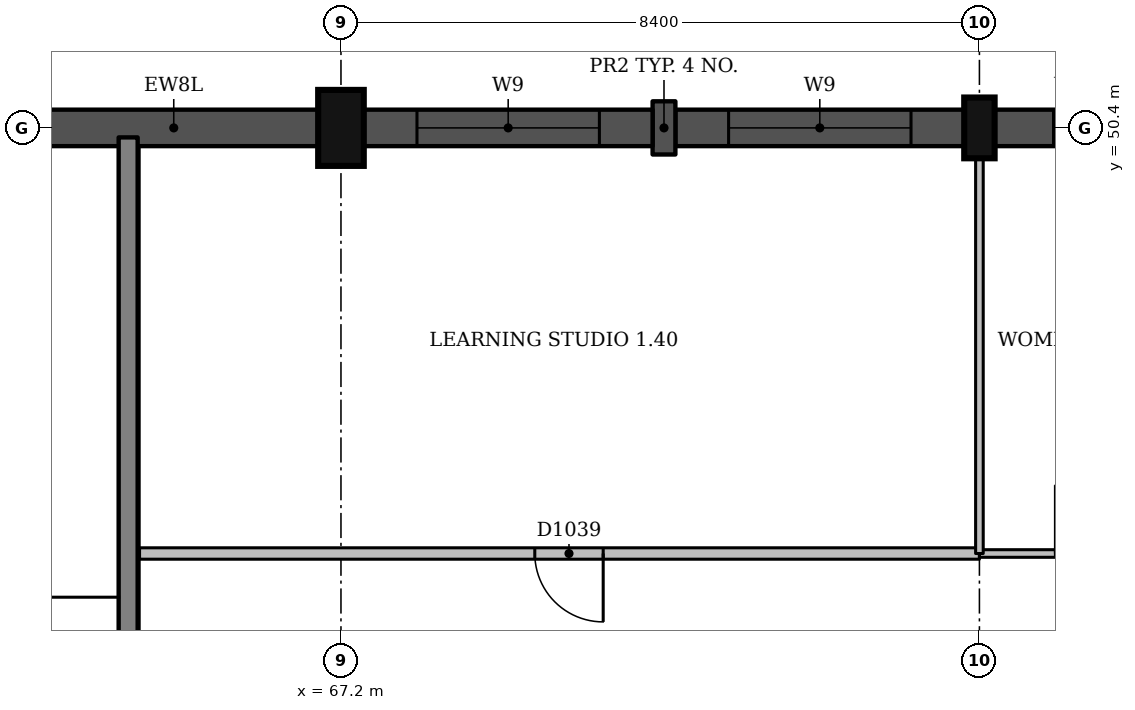
"""IFC4 building model, lengths in metres.
Left out: names, types, materials, properties, quantities, classifications, styles, units other than length and angle.
Written with IfcOpenShell. Run it as: python <this file> out.ifc"""

import sys

from ifc_helpers import new_model, si_unit, direction, frame, frame_2d, origin, origin_2d, place, context, subcontext, project, spatial, rectangle, extrude, element, fill, save


model = new_model("IFC4")
c1 = context("Model", 3, precision=1e-05, world=origin(), true_north=direction((0.0, 1.0)))
c2 = subcontext(c1, "Body", "Model", "MODEL_VIEW")
j1 = project(units=[si_unit("LENGTHUNIT", "METRE"), si_unit("PLANEANGLEUNIT", "RADIAN")], contexts=[c1])
p1 = place(None, origin())
s1 = spatial("IfcSite", under=j1, at=p1, CompositionType="ELEMENT")
p2 = place(p1, origin())
s2 = spatial("IfcBuilding", under=s1, at=p2, CompositionType="ELEMENT")
p3 = place(p2, frame((0.0, 0.0, 4.5)))
s3 = spatial("IfcBuildingStorey", under=s2, at=p3, CompositionType="ELEMENT", Elevation=4.5)
p4 = place(p3, frame((67.2, 50.4, 0.0), z_axis=(0.0, 0.0, 1.0), x_axis=(1.0, 0.0, 0.0)))
e1 = element("IfcColumn", 1, at=p4, inside=s3, PredefinedType="COLUMN", context=c2, shape_type="SweptSolid", body=[
    extrude(rectangle(XDim=0.6, YDim=1.0, at=origin_2d()), origin(), (0.0, 0.0, 1.0), 4.5),
])
p5 = place(p3, frame((75.6, 50.4, 0.0), z_axis=(0.0, 0.0, 1.0), x_axis=(1.0, 0.0, 0.0)))
e2 = element("IfcColumn", 2, at=p5, inside=s3, PredefinedType="COLUMN", context=c2, shape_type="SweptSolid", body=[
    extrude(rectangle(XDim=0.4, YDim=0.8, at=origin_2d()), origin(), (0.0, 0.0, 1.0), 4.5),
])
p6 = place(p3, frame((64.4, 42.125, 0.0), z_axis=(0.0, 0.0, 1.0), x_axis=(0.0, 1.0, 0.0)))
e3 = element("IfcWall", 3, at=p6, inside=s3, PredefinedType="SHEAR", context=c2, shape_type="SweptSolid", body=[
    extrude(rectangle(XDim=8.15, YDim=0.25, at=frame_2d((4.075, 0.0))), origin(), (0.0, 0.0, 1.0), 4.5),
])
p7 = place(p3, frame((77.95, 50.4, 0.0), z_axis=(0.0, 0.0, 1.0), x_axis=(-1.0, 0.0, 0.0)))
e4 = element("IfcWall", 4, at=p7, inside=s3, PredefinedType="SOLIDWALL", context=c2, shape_type="SweptSolid", body=[
    extrude(rectangle(XDim=2.15, YDim=0.48, at=frame_2d((1.075, 0.0))), origin(), (0.0, 0.0, 1.0), 3.75),
])
p8 = place(p7, frame((0.775, 0.0, 1.5)))
e5 = element("IfcOpeningElement", 5, at=p8, cuts=e4, PredefinedType="OPENING", context=c2, shape_type="SweptSolid", body=[
    extrude(rectangle(XDim=0.6, YDim=1.2, at=frame_2d((0.3, 0.6))), frame((0.0, 0.25, 0.0), z_axis=(0.0, -1.0, 0.0), x_axis=(1.0, 0.0, 0.0)), (0.0, 0.0, 1.0), 0.5),
])
p9 = place(p3, frame((75.4, 50.4, 0.0), z_axis=(0.0, 0.0, 1.0), x_axis=(-1.0, 0.0, 0.0)))
e6 = element("IfcWall", 6, at=p9, inside=s3, PredefinedType="SOLIDWALL", context=c2, shape_type="SweptSolid", body=[
    extrude(rectangle(XDim=3.8, YDim=0.48, at=frame_2d((1.9, 0.0))), origin(), (0.0, 0.0, 1.0), 3.75),
])
p10 = place(p9, frame((0.7, 0.0, 0.9)))
e7 = element("IfcOpeningElement", 7, at=p10, cuts=e6, PredefinedType="OPENING", context=c2, shape_type="SweptSolid", body=[
    extrude(rectangle(XDim=2.4, YDim=1.8, at=frame_2d((1.2, 0.9))), frame((0.0, 0.25, 0.0), z_axis=(0.0, -1.0, 0.0), x_axis=(1.0, 0.0, 0.0)), (0.0, 0.0, 1.0), 0.5),
])
p11 = place(p3, frame((71.6, 50.4, 0.0), z_axis=(0.0, 0.0, 1.0), x_axis=(-1.0, 0.0, 0.0)))
e8 = element("IfcWall", 8, at=p11, inside=s3, PredefinedType="SOLIDWALL", context=c2, shape_type="SweptSolid", body=[
    extrude(rectangle(XDim=0.3, YDim=0.7, at=frame_2d((0.15, 0.0))), origin(), (0.0, 0.0, 1.0), 3.75),
])
p12 = place(p3, frame((71.3, 50.4, 0.0), z_axis=(0.0, 0.0, 1.0), x_axis=(-1.0, 0.0, 0.0)))
e9 = element("IfcWall", 9, at=p12, inside=s3, PredefinedType="SOLIDWALL", context=c2, shape_type="SweptSolid", body=[
    extrude(rectangle(XDim=3.8, YDim=0.48, at=frame_2d((1.9, 0.0))), origin(), (0.0, 0.0, 1.0), 3.75),
])
p13 = place(p12, frame((0.7, 0.0, 0.9)))
e10 = element("IfcOpeningElement", 10, at=p13, cuts=e9, PredefinedType="OPENING", context=c2, shape_type="SweptSolid", body=[
    extrude(rectangle(XDim=2.4, YDim=1.8, at=frame_2d((1.2, 0.9))), frame((0.0, 0.25, 0.0), z_axis=(0.0, -1.0, 0.0), x_axis=(1.0, 0.0, 0.0)), (0.0, 0.0, 1.0), 0.5),
])
p14 = place(p3, frame((66.9, 50.4, 0.0), z_axis=(0.0, 0.0, 1.0), x_axis=(-1.0, 0.0, 0.0)))
e11 = element("IfcWall", 11, at=p14, inside=s3, PredefinedType="SOLIDWALL", context=c2, shape_type="SweptSolid", body=[
    extrude(rectangle(XDim=3.8, YDim=0.48, at=frame_2d((1.9, 0.0))), origin(), (0.0, 0.0, 1.0), 3.75),
])
p15 = place(p3, frame((64.55, 44.8, 0.0), z_axis=(0.0, 0.0, 1.0), x_axis=(1.0, 0.0, 0.0)))
e12 = element("IfcWall", 12, at=p15, inside=s3, PredefinedType="PARTITIONING", context=c2, shape_type="SweptSolid", body=[
    extrude(rectangle(XDim=11.05, YDim=0.15, at=frame_2d((5.525, 0.0))), origin(), (0.0, 0.0, 1.0), 4.15),
])
p16 = place(p15, frame((5.2, 0.0, 0.0)))
e13 = element("IfcOpeningElement", 13, at=p16, cuts=e12, PredefinedType="OPENING", context=c2, shape_type="SweptSolid", body=[
    extrude(rectangle(XDim=0.9, YDim=2.1, at=frame_2d((0.45, 1.05))), frame((0.0, 0.085, 0.0), z_axis=(0.0, -1.0, 0.0), x_axis=(1.0, 0.0, 0.0)), (0.0, 0.0, 1.0), 0.17),
])
p17 = place(p3, frame((75.6, 44.8, 0.0), z_axis=(0.0, 0.0, 1.0), x_axis=(1.0, 0.0, 0.0)))
e14 = element("IfcWall", 14, at=p17, inside=s3, PredefinedType="PARTITIONING", context=c2, shape_type="SweptSolid", body=[
    extrude(rectangle(XDim=8.25, YDim=0.1, at=frame_2d((4.125, 0.0))), origin(), (0.0, 0.0, 1.0), 4.15),
])
p18 = place(p17, frame((1.0, 0.0, 0.0)))
e15 = element("IfcOpeningElement", 15, at=p18, cuts=e14, PredefinedType="OPENING", context=c2, shape_type="SweptSolid", body=[
    extrude(rectangle(XDim=0.9, YDim=2.1, at=frame_2d((0.45, 1.05))), frame((0.0, 0.06, 0.0), z_axis=(0.0, -1.0, 0.0), x_axis=(1.0, 0.0, 0.0)), (0.0, 0.0, 1.0), 0.12),
])
p19 = place(p17, frame((3.8, 0.0, 0.0)))
e16 = element("IfcOpeningElement", 16, at=p19, cuts=e14, PredefinedType="OPENING", context=c2, shape_type="SweptSolid", body=[
    extrude(rectangle(XDim=0.9, YDim=2.1, at=frame_2d((0.45, 1.05))), frame((0.0, 0.06, 0.0), z_axis=(0.0, -1.0, 0.0), x_axis=(1.0, 0.0, 0.0)), (0.0, 0.0, 1.0), 0.12),
])
p20 = place(p17, frame((6.6, 0.0, 0.0)))
e17 = element("IfcOpeningElement", 17, at=p20, cuts=e14, PredefinedType="OPENING", context=c2, shape_type="SweptSolid", body=[
    extrude(rectangle(XDim=1.0, YDim=2.1, at=frame_2d((0.5, 1.05))), frame((0.0, 0.06, 0.0), z_axis=(0.0, -1.0, 0.0), x_axis=(1.0, 0.0, 0.0)), (0.0, 0.0, 1.0), 0.12),
])
p21 = place(p3, frame((75.6, 44.8, 0.0), z_axis=(0.0, 0.0, 1.0), x_axis=(0.0, 1.0, 0.0)))
e18 = element("IfcWall", 18, at=p21, inside=s3, PredefinedType="PARTITIONING", context=c2, shape_type="SweptSolid", body=[
    extrude(rectangle(XDim=5.2, YDim=0.1, at=frame_2d((2.6, 0.0))), origin(), (0.0, 0.0, 1.0), 2.489),
])
p22 = place(p8, origin())
e19 = element("IfcWindow", 19, at=p22, inside=s3, PartitioningType="SINGLE_PANEL", PredefinedType="WINDOW", context=c2, shape_type="SweptSolid", body=[
    extrude(rectangle(XDim=0.6, YDim=1.2, at=frame_2d((0.3, 0.6))), frame((0.0, 0.12, 0.0), z_axis=(0.0, -1.0, 0.0), x_axis=(1.0, 0.0, 0.0)), (0.0, 0.0, 1.0), 0.06),
])
fill(e5, e19)
p23 = place(p10, origin())
e20 = element("IfcWindow", 20, at=p23, inside=s3, PartitioningType="SINGLE_PANEL", PredefinedType="WINDOW", context=c2, shape_type="SweptSolid", body=[
    extrude(rectangle(XDim=2.4, YDim=1.8, at=frame_2d((1.2, 0.9))), frame((0.0, 0.12, 0.0), z_axis=(0.0, -1.0, 0.0), x_axis=(1.0, 0.0, 0.0)), (0.0, 0.0, 1.0), 0.06),
])
fill(e7, e20)
p24 = place(p13, origin())
e21 = element("IfcWindow", 21, at=p24, inside=s3, PartitioningType="SINGLE_PANEL", PredefinedType="WINDOW", context=c2, shape_type="SweptSolid", body=[
    extrude(rectangle(XDim=2.4, YDim=1.8, at=frame_2d((1.2, 0.9))), frame((0.0, 0.12, 0.0), z_axis=(0.0, -1.0, 0.0), x_axis=(1.0, 0.0, 0.0)), (0.0, 0.0, 1.0), 0.06),
])
fill(e10, e21)
p25 = place(p16, origin())
e22 = element("IfcDoor", 22, at=p25, inside=s3, OperationType="SINGLE_SWING_RIGHT", PredefinedType="DOOR", context=c2, shape_type="SweptSolid", body=[
    extrude(rectangle(XDim=0.9, YDim=2.1, at=frame_2d((0.45, 1.05))), frame((0.0, 0.025, 0.0), z_axis=(0.0, -1.0, 0.0), x_axis=(1.0, 0.0, 0.0)), (0.0, 0.0, 1.0), 0.05),
])
fill(e13, e22)
save(model, sys.argv[1])
